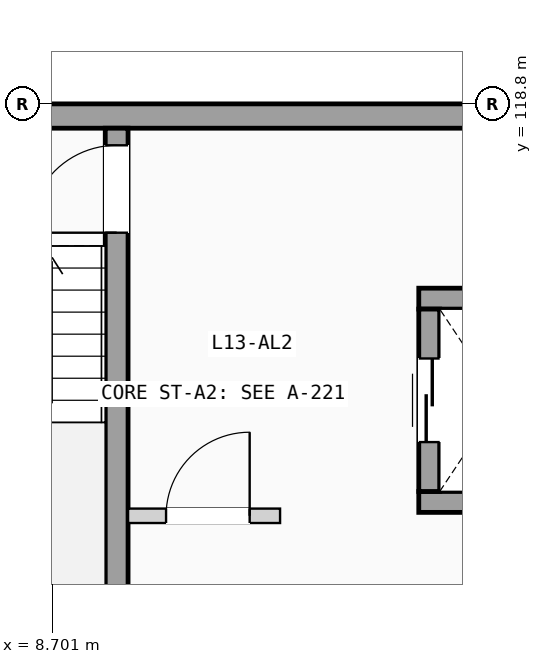
"""IFC4 building model, lengths in metres.
Left out: names, types, materials, properties, quantities, classifications, styles, units other than length and angle.
Written with IfcOpenShell. Run it as: python <this file> out.ifc"""

import sys

from ifc_helpers import new_model, si_unit, direction, frame, frame_2d, origin, place, context, subcontext, project, spatial, rectangle, extrude, element, fill, save


model = new_model("IFC4")
c1 = context("Model", 3, precision=1e-05, world=origin(), true_north=direction((0.0, 1.0)))
c2 = subcontext(c1, "Body", "Model", "MODEL_VIEW")
j1 = project(units=[si_unit("LENGTHUNIT", "METRE"), si_unit("PLANEANGLEUNIT", "RADIAN")], contexts=[c1])
p1 = place(None, origin())
s1 = spatial("IfcSite", under=j1, at=p1, CompositionType="ELEMENT")
p2 = place(p1, origin())
s2 = spatial("IfcBuilding", under=s1, at=p2, CompositionType="ELEMENT")
p3 = place(p2, frame((0.0, 0.0, 43.575)))
s3 = spatial("IfcBuildingStorey", under=s2, at=p3, CompositionType="ELEMENT", Elevation=43.575)
p4 = place(p3, frame((0.0, 118.64, 0.0), z_axis=(0.0, 0.0, 1.0), x_axis=(1.0, 0.0, 0.0)))
e1 = element("IfcWall", 1, at=p4, inside=s3, PredefinedType="SOLIDWALL", context=c2, shape_type="SweptSolid", body=[
    extrude(rectangle(XDim=21.6, YDim=0.32, at=frame_2d((10.8, 0.0))), origin(), (0.0, 0.0, 1.0), 2.6),
])
p5 = place(p3, frame((9.55, 111.48, 0.0), z_axis=(0.0, 0.0, 1.0), x_axis=(0.0, 1.0, 0.0)))
e2 = element("IfcWall", 2, at=p5, inside=s3, PredefinedType="SHEAR", context=c2, shape_type="SweptSolid", body=[
    extrude(rectangle(XDim=7.0, YDim=0.3, at=frame_2d((3.5, 0.0))), origin(), (0.0, 0.0, 1.0), 2.9),
])
p6 = place(p5, frame((5.625, 0.0, 0.0)))
e3 = element("IfcOpeningElement", 3, at=p6, cuts=e2, PredefinedType="OPENING", context=c2, shape_type="SweptSolid", body=[
    extrude(rectangle(XDim=1.15, YDim=2.12, at=frame_2d((0.575, 1.06))), frame((0.0, 0.16, 0.0), z_axis=(0.0, -1.0, 0.0), x_axis=(1.0, 0.0, 0.0)), (0.0, 0.0, 1.0), 0.32),
])
for number, where, z_axis, x_axis in (
    (4, (13.525, 113.562, 0.0), (0.0, 0.0, 1.0), (1.0, 0.0, 0.0)),
    (5, (13.525, 116.238, 0.0), (0.0, 0.0, 1.0), (1.0, 0.0, 0.0)),
):
    element("IfcWall", number, at=place(p3, frame(where, z_axis=z_axis, x_axis=x_axis)), inside=s3, PredefinedType="SHEAR", context=c2, shape_type="SweptSolid", body=[
        extrude(rectangle(XDim=2.15, YDim=0.275, at=frame_2d((1.075, 0.0))), origin(), (0.0, 0.0, 1.0), 2.9),
    ])
p7 = place(p3, frame((13.663, 113.7, 0.0), z_axis=(0.0, 0.0, 1.0), x_axis=(0.0, 1.0, 0.0)))
e6 = element("IfcWall", 6, at=p7, inside=s3, PredefinedType="SHEAR", context=c2, shape_type="SweptSolid", body=[
    extrude(rectangle(XDim=2.4, YDim=0.275, at=frame_2d((1.2, 0.0))), origin(), (0.0, 0.0, 1.0), 2.9),
])
p8 = place(p7, frame((0.65, 0.0, 0.0)))
e7 = element("IfcOpeningElement", 7, at=p8, cuts=e6, PredefinedType="OPENING", context=c2, shape_type="SweptSolid", body=[
    extrude(rectangle(XDim=1.1, YDim=2.15, at=frame_2d((0.55, 1.075))), frame((0.0, 0.147, 0.0), z_axis=(0.0, -1.0, 0.0), x_axis=(1.0, 0.0, 0.0)), (0.0, 0.0, 1.0), 0.295),
])
p9 = place(p3, frame((9.7, 113.38, 0.0), z_axis=(0.0, 0.0, 1.0), x_axis=(1.0, 0.0, 0.0)))
e8 = element("IfcWall", 8, at=p9, inside=s3, PredefinedType="PARTITIONING", context=c2, shape_type="SweptSolid", body=[
    extrude(rectangle(XDim=2.0, YDim=0.19, at=frame_2d((1.0, 0.0))), origin(), (0.0, 0.0, 1.0), 2.87),
])
p10 = place(p9, frame((0.5, 0.0, 0.0)))
e9 = element("IfcOpeningElement", 9, at=p10, cuts=e8, PredefinedType="OPENING", context=c2, shape_type="SweptSolid", body=[
    extrude(rectangle(XDim=1.1, YDim=2.12, at=frame_2d((0.55, 1.06))), frame((0.0, 0.105, 0.0), z_axis=(0.0, -1.0, 0.0), x_axis=(1.0, 0.0, 0.0)), (0.0, 0.0, 1.0), 0.21),
])
p11 = place(p6, origin())
e10 = element("IfcDoor", 10, at=p11, inside=s3, OperationType="SINGLE_SWING_LEFT", PredefinedType="DOOR", context=c2, shape_type="SweptSolid", body=[
    extrude(rectangle(XDim=1.15, YDim=2.12, at=frame_2d((0.575, 1.06))), frame((0.0, 0.025, 0.0), z_axis=(0.0, -1.0, 0.0), x_axis=(1.0, 0.0, 0.0)), (0.0, 0.0, 1.0), 0.05),
])
fill(e3, e10)
p12 = place(p8, origin())
e11 = element("IfcDoor", 11, at=p12, inside=s3, OperationType="SLIDING_TO_LEFT", PredefinedType="DOOR", context=c2, shape_type="SweptSolid", body=[
    extrude(rectangle(XDim=1.1, YDim=2.15, at=frame_2d((0.55, 1.075))), frame((0.0, 0.025, 0.0), z_axis=(0.0, -1.0, 0.0), x_axis=(1.0, 0.0, 0.0)), (0.0, 0.0, 1.0), 0.05),
])
fill(e7, e11)
p13 = place(p10, origin())
e12 = element("IfcDoor", 12, at=p13, inside=s3, OperationType="SINGLE_SWING_RIGHT", PredefinedType="DOOR", context=c2, shape_type="SweptSolid", body=[
    extrude(rectangle(XDim=1.1, YDim=2.12, at=frame_2d((0.55, 1.06))), frame((0.0, 0.025, 0.0), z_axis=(0.0, -1.0, 0.0), x_axis=(1.0, 0.0, 0.0)), (0.0, 0.0, 1.0), 0.05),
])
fill(e9, e12)
save(model, sys.argv[1])
